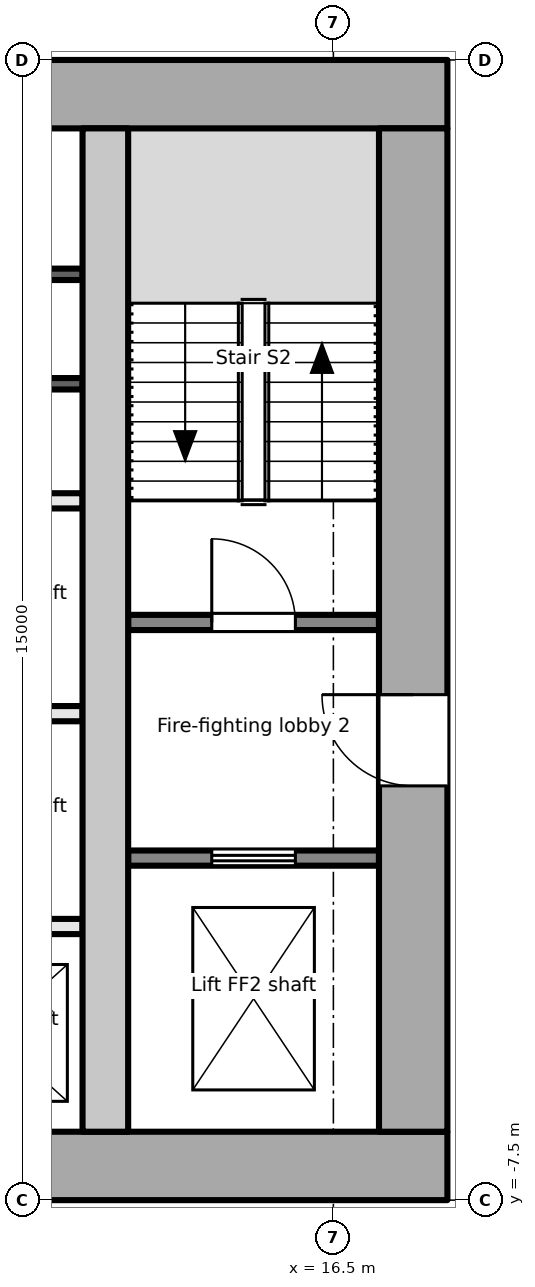
"""IFC4 building model, lengths in metres.
Left out: names, types, materials, properties, quantities, classifications, styles, units other than length and angle.
Written with IfcOpenShell. Run it as: python <this file> out.ifc"""

import sys

from ifc_helpers import new_model, si_unit, direction, frame, frame_2d, origin, place, context, subcontext, project, spatial, rectangle, extrude, element, fill, save


model = new_model("IFC4")
c1 = context("Model", 3, precision=1e-05, world=origin(), true_north=direction((0.0, 1.0)))
c2 = subcontext(c1, "Body", "Model", "MODEL_VIEW")
j1 = project(units=[si_unit("LENGTHUNIT", "METRE"), si_unit("PLANEANGLEUNIT", "RADIAN")], contexts=[c1])
p1 = place(None, origin())
s1 = spatial("IfcSite", under=j1, at=p1, CompositionType="ELEMENT")
p2 = place(p1, origin())
s2 = spatial("IfcBuilding", under=s1, at=p2, CompositionType="ELEMENT")
p3 = place(p2, frame((0.0, 0.0, 91.7)))
s3 = spatial("IfcBuildingStorey", under=s2, at=p3, CompositionType="ELEMENT", Elevation=91.7)
p4 = place(p3, frame((-18.0, -7.05, -0.2), z_axis=(0.0, 0.0, 1.0), x_axis=(1.0, 0.0, 0.0)))
e1 = element("IfcWall", 1, at=p4, inside=s3, PredefinedType="SHEAR", context=c2, shape_type="SweptSolid", body=[
    extrude(rectangle(XDim=36.0, YDim=0.9, at=frame_2d((18.0, 0.0))), origin(), (0.0, 0.0, 1.0), 4.0),
])
p5 = place(p4, frame((7.8, 0.0, 0.2)))
e2 = element("IfcOpeningElement", 2, at=p5, cuts=e1, PredefinedType="OPENING", context=c2, shape_type="SweptSolid", body=[
    extrude(rectangle(XDim=2.4, YDim=2.1, at=frame_2d((1.2, 1.05))), frame((0.0, 0.46, 0.0), z_axis=(0.0, -1.0, 0.0), x_axis=(1.0, 0.0, 0.0)), (0.0, 0.0, 1.0), 0.921),
])
p6 = place(p4, frame((17.4, 0.0, 0.2)))
e3 = element("IfcOpeningElement", 3, at=p6, cuts=e1, PredefinedType="OPENING", context=c2, shape_type="SweptSolid", body=[
    extrude(rectangle(XDim=1.2, YDim=2.1, at=frame_2d((0.6, 1.05))), frame((0.0, 0.46, 0.0), z_axis=(0.0, -1.0, 0.0), x_axis=(1.0, 0.0, 0.0)), (0.0, 0.0, 1.0), 0.921),
])
p7 = place(p4, frame((26.1, 0.0, 0.2)))
e4 = element("IfcOpeningElement", 4, at=p7, cuts=e1, PredefinedType="OPENING", context=c2, shape_type="SweptSolid", body=[
    extrude(rectangle(XDim=2.4, YDim=2.1, at=frame_2d((1.2, 1.05))), frame((0.0, 0.46, 0.0), z_axis=(0.0, -1.0, 0.0), x_axis=(1.0, 0.0, 0.0)), (0.0, 0.0, 1.0), 0.921),
])
p8 = place(p3, frame((-18.0, 7.05, -0.2), z_axis=(0.0, 0.0, 1.0), x_axis=(1.0, 0.0, 0.0)))
e5 = element("IfcWall", 5, at=p8, inside=s3, PredefinedType="SHEAR", context=c2, shape_type="SweptSolid", body=[
    extrude(rectangle(XDim=36.0, YDim=0.9, at=frame_2d((18.0, 0.0))), origin(), (0.0, 0.0, 1.0), 4.0),
])
p9 = place(p3, frame((17.55, -6.6, -0.2), z_axis=(0.0, 0.0, 1.0), x_axis=(0.0, 1.0, 0.0)))
e6 = element("IfcWall", 6, at=p9, inside=s3, PredefinedType="SHEAR", context=c2, shape_type="SweptSolid", body=[
    extrude(rectangle(XDim=13.2, YDim=0.9, at=frame_2d((6.6, 0.0))), origin(), (0.0, 0.0, 1.0), 4.0),
])
p10 = place(p9, frame((4.55, 0.0, 0.2)))
e7 = element("IfcOpeningElement", 7, at=p10, cuts=e6, PredefinedType="OPENING", context=c2, shape_type="SweptSolid", body=[
    extrude(rectangle(XDim=1.2, YDim=2.1, at=frame_2d((0.6, 1.05))), frame((0.0, 0.46, 0.0), z_axis=(0.0, -1.0, 0.0), x_axis=(1.0, 0.0, 0.0)), (0.0, 0.0, 1.0), 0.921),
])
p11 = place(p3, frame((13.5, -6.6, -0.2), z_axis=(0.0, 0.0, 1.0), x_axis=(0.0, 1.0, 0.0)))
e8 = element("IfcWall", 8, at=p11, inside=s3, PredefinedType="SHEAR", context=c2, shape_type="SweptSolid", body=[
    extrude(rectangle(XDim=13.2, YDim=0.6, at=frame_2d((6.6, 0.0))), origin(), (0.0, 0.0, 1.0), 4.0),
])
p12 = place(p3, frame((13.8, -3.0, 0.0), z_axis=(0.0, 0.0, 1.0), x_axis=(1.0, 0.0, 0.0)))
e9 = element("IfcWall", 9, at=p12, inside=s3, PredefinedType="PARTITIONING", context=c2, shape_type="SweptSolid", body=[
    extrude(rectangle(XDim=3.3, YDim=0.2, at=frame_2d((1.65, 0.0))), origin(), (0.0, 0.0, 1.0), 3.8),
])
p13 = place(p12, frame((1.1, 0.0, 0.0)))
e10 = element("IfcOpeningElement", 10, at=p13, cuts=e9, PredefinedType="OPENING", context=c2, shape_type="SweptSolid", body=[
    extrude(rectangle(XDim=1.1, YDim=2.1, at=frame_2d((0.55, 1.05))), frame((0.0, 0.111, 0.0), z_axis=(0.0, -1.0, 0.0), x_axis=(1.0, 0.0, 0.0)), (0.0, 0.0, 1.0), 0.221),
])
p14 = place(p3, frame((13.8, 0.1, 0.0), z_axis=(0.0, 0.0, 1.0), x_axis=(1.0, 0.0, 0.0)))
e11 = element("IfcWall", 11, at=p14, inside=s3, PredefinedType="PARTITIONING", context=c2, shape_type="SweptSolid", body=[
    extrude(rectangle(XDim=3.3, YDim=0.2, at=frame_2d((1.65, 0.0))), origin(), (0.0, 0.0, 1.0), 3.8),
])
p15 = place(p14, frame((1.1, 0.0, 0.0)))
e12 = element("IfcOpeningElement", 12, at=p15, cuts=e11, PredefinedType="OPENING", context=c2, shape_type="SweptSolid", body=[
    extrude(rectangle(XDim=1.1, YDim=2.1, at=frame_2d((0.55, 1.05))), frame((0.0, 0.111, 0.0), z_axis=(0.0, -1.0, 0.0), x_axis=(1.0, 0.0, 0.0)), (0.0, 0.0, 1.0), 0.221),
])
for number, where, z_axis, x_axis in (
    (13, (10.9, -3.9, 0.0), (0.0, 0.0, 1.0), (1.0, 0.0, 0.0)),
    (14, (10.9, -1.1, 0.0), (0.0, 0.0, 1.0), (1.0, 0.0, 0.0)),
    (15, (10.9, 1.7, 0.0), (0.0, 0.0, 1.0), (1.0, 0.0, 0.0)),
):
    element("IfcWall", number, at=place(p3, frame(where, z_axis=z_axis, x_axis=x_axis)), inside=s3, PredefinedType="PARTITIONING", context=c2, shape_type="SweptSolid", body=[
        extrude(rectangle(XDim=2.3, YDim=0.2, at=frame_2d((1.15, 0.0))), origin(), (0.0, 0.0, 1.0), 3.8),
    ])
for number, where, z_axis, x_axis in (
    (16, (10.9, 3.24, 0.0), (0.0, 0.0, 1.0), (1.0, 0.0, 0.0)),
    (17, (10.9, 4.68, 0.0), (0.0, 0.0, 1.0), (1.0, 0.0, 0.0)),
):
    element("IfcWall", number, at=place(p3, frame(where, z_axis=z_axis, x_axis=x_axis)), inside=s3, PredefinedType="PARTITIONING", context=c2, shape_type="SweptSolid", body=[
        extrude(rectangle(XDim=2.3, YDim=0.15, at=frame_2d((1.15, 0.0))), origin(), (0.0, 0.0, 1.0), 3.8),
    ])
p16 = place(p13, origin())
e18 = element("IfcDoor", 18, at=p16, inside=s3, OperationType="DOUBLE_DOOR_SLIDING", PredefinedType="DOOR", context=c2, shape_type="SweptSolid", body=[
    extrude(rectangle(XDim=1.1, YDim=2.1, at=frame_2d((0.55, 1.05))), frame((0.0, 0.025, 0.0), z_axis=(0.0, -1.0, 0.0), x_axis=(1.0, 0.0, 0.0)), (0.0, 0.0, 1.0), 0.05),
])
fill(e10, e18)
p17 = place(p10, origin())
e19 = element("IfcDoor", 19, at=p17, inside=s3, OperationType="SINGLE_SWING_RIGHT", PredefinedType="DOOR", context=c2, shape_type="SweptSolid", body=[
    extrude(rectangle(XDim=1.2, YDim=2.1, at=frame_2d((0.6, 1.05))), frame((0.0, 0.025, 0.0), z_axis=(0.0, -1.0, 0.0), x_axis=(1.0, 0.0, 0.0)), (0.0, 0.0, 1.0), 0.05),
])
fill(e7, e19)
p18 = place(p15, origin())
e20 = element("IfcDoor", 20, at=p18, inside=s3, OperationType="SINGLE_SWING_LEFT", PredefinedType="DOOR", context=c2, shape_type="SweptSolid", body=[
    extrude(rectangle(XDim=1.1, YDim=2.1, at=frame_2d((0.55, 1.05))), frame((0.0, 0.025, 0.0), z_axis=(0.0, -1.0, 0.0), x_axis=(1.0, 0.0, 0.0)), (0.0, 0.0, 1.0), 0.05),
])
fill(e12, e20)
save(model, sys.argv[1])
